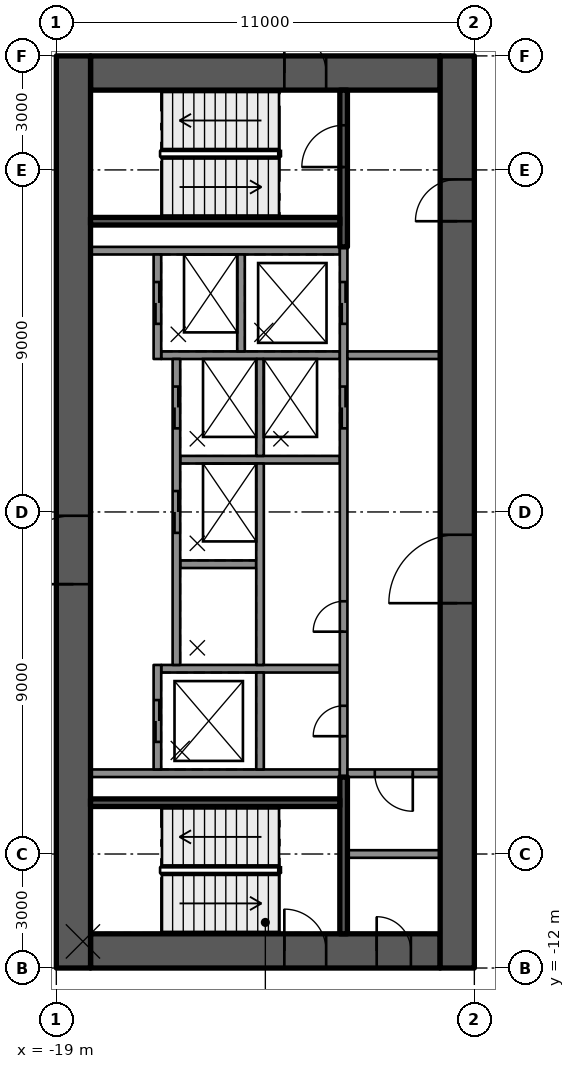
"""IFC4 building model, lengths in metres.
Left out: names, types, materials, properties, quantities, classifications, styles, units other than length and angle.
Written with IfcOpenShell. Run it as: python <this file> out.ifc"""

import sys

from ifc_helpers import new_model, si_unit, direction, frame, frame_2d, origin, place, context, subcontext, project, spatial, rectangle, extrude, element, fill, save


model = new_model("IFC4")
c1 = context("Model", 3, precision=1e-05, world=origin(), true_north=direction((0.0, 1.0)))
c2 = subcontext(c1, "Body", "Model", "MODEL_VIEW")
j1 = project(units=[si_unit("LENGTHUNIT", "METRE"), si_unit("PLANEANGLEUNIT", "RADIAN")], contexts=[c1])
p1 = place(None, origin())
s1 = spatial("IfcSite", under=j1, at=p1, CompositionType="ELEMENT")
p2 = place(p1, origin())
s2 = spatial("IfcBuilding", under=s1, at=p2, CompositionType="ELEMENT")
p3 = place(p2, frame((0.0, 0.0, 184.6)))
s3 = spatial("IfcBuildingStorey", under=s2, at=p3, CompositionType="ELEMENT", Elevation=184.6)
p4 = place(p3, frame((-18.1, 11.55, 0.0), z_axis=(0.0, 0.0, 1.0), x_axis=(1.0, 0.0, 0.0)))
e1 = element("IfcWall", 1, at=p4, inside=s3, PredefinedType="SHEAR", context=c2, shape_type="SweptSolid", body=[
    extrude(rectangle(XDim=9.2, YDim=0.9, at=frame_2d((4.6, 0.0))), origin(), (0.0, 0.0, 1.0), 4.0),
])
p5 = place(p4, frame((5.1, 0.0, 0.0)))
e2 = element("IfcOpeningElement", 2, at=p5, cuts=e1, PredefinedType="OPENING", context=c2, shape_type="SweptSolid", body=[
    extrude(rectangle(XDim=1.1, YDim=2.1, at=frame_2d((0.55, 1.05))), frame((0.0, 0.46, 0.0), z_axis=(0.0, -1.0, 0.0), x_axis=(1.0, 0.0, 0.0)), (0.0, 0.0, 1.0), 0.92),
])
p6 = place(p3, frame((-18.1, -11.55, 0.0), z_axis=(0.0, 0.0, 1.0), x_axis=(1.0, 0.0, 0.0)))
e3 = element("IfcWall", 3, at=p6, inside=s3, PredefinedType="SHEAR", context=c2, shape_type="SweptSolid", body=[
    extrude(rectangle(XDim=9.2, YDim=0.9, at=frame_2d((4.6, 0.0))), origin(), (0.0, 0.0, 1.0), 4.0),
])
p7 = place(p6, frame((5.1, 0.0, 0.0)))
e4 = element("IfcOpeningElement", 4, at=p7, cuts=e3, PredefinedType="OPENING", context=c2, shape_type="SweptSolid", body=[
    extrude(rectangle(XDim=1.1, YDim=2.1, at=frame_2d((0.55, 1.05))), frame((0.0, 0.46, 0.0), z_axis=(0.0, -1.0, 0.0), x_axis=(1.0, 0.0, 0.0)), (0.0, 0.0, 1.0), 0.92),
])
p8 = place(p6, frame((7.53, 0.0, 0.0)))
e5 = element("IfcOpeningElement", 5, at=p8, cuts=e3, PredefinedType="OPENING", context=c2, shape_type="SweptSolid", body=[
    extrude(rectangle(XDim=0.9, YDim=2.1, at=frame_2d((0.45, 1.05))), frame((0.0, 0.46, 0.0), z_axis=(0.0, -1.0, 0.0), x_axis=(1.0, 0.0, 0.0)), (0.0, 0.0, 1.0), 0.92),
])
p9 = place(p3, frame((-18.55, -12.0, 0.0), z_axis=(0.0, 0.0, 1.0), x_axis=(0.0, 1.0, 0.0)))
e6 = element("IfcWall", 6, at=p9, inside=s3, PredefinedType="SHEAR", context=c2, shape_type="SweptSolid", body=[
    extrude(rectangle(XDim=24.0, YDim=0.9, at=frame_2d((12.0, 0.0))), origin(), (0.0, 0.0, 1.0), 4.0),
])
p10 = place(p9, frame((10.1, 0.0, 0.0)))
e7 = element("IfcOpeningElement", 7, at=p10, cuts=e6, PredefinedType="OPENING", context=c2, shape_type="SweptSolid", body=[
    extrude(rectangle(XDim=1.8, YDim=2.1, at=frame_2d((0.9, 1.05))), frame((0.0, 0.46, 0.0), z_axis=(0.0, -1.0, 0.0), x_axis=(1.0, 0.0, 0.0)), (0.0, 0.0, 1.0), 0.92),
])
p11 = place(p3, frame((-8.45, -12.0, 0.0), z_axis=(0.0, 0.0, 1.0), x_axis=(0.0, 1.0, 0.0)))
e8 = element("IfcWall", 8, at=p11, inside=s3, PredefinedType="SHEAR", context=c2, shape_type="SweptSolid", body=[
    extrude(rectangle(XDim=24.0, YDim=0.9, at=frame_2d((12.0, 0.0))), origin(), (0.0, 0.0, 1.0), 4.0),
])
p12 = place(p11, frame((9.6, 0.0, 0.0)))
e9 = element("IfcOpeningElement", 9, at=p12, cuts=e8, PredefinedType="OPENING", context=c2, shape_type="SweptSolid", body=[
    extrude(rectangle(XDim=1.8, YDim=2.1, at=frame_2d((0.9, 1.05))), frame((0.0, 0.46, 0.0), z_axis=(0.0, -1.0, 0.0), x_axis=(1.0, 0.0, 0.0)), (0.0, 0.0, 1.0), 0.92),
])
p13 = place(p11, frame((19.65, 0.0, 0.0)))
e10 = element("IfcOpeningElement", 10, at=p13, cuts=e8, PredefinedType="OPENING", context=c2, shape_type="SweptSolid", body=[
    extrude(rectangle(XDim=1.1, YDim=2.1, at=frame_2d((0.55, 1.05))), frame((0.0, 0.46, 0.0), z_axis=(0.0, -1.0, 0.0), x_axis=(1.0, 0.0, 0.0)), (0.0, 0.0, 1.0), 0.92),
])
for number, where, z_axis, x_axis in (
    (11, (-11.54, 6.875, 0.0), (0.0, 0.0, 1.0), (-1.0, 0.0, 0.0)),
    (12, (-11.54, -6.875, 0.0), (0.0, 0.0, 1.0), (-1.0, 0.0, 0.0)),
):
    element("IfcWall", number, at=place(p3, frame(where, z_axis=z_axis, x_axis=x_axis)), inside=s3, PredefinedType="SOLIDWALL", context=c2, shape_type="SweptSolid", body=[
        extrude(rectangle(XDim=6.56, YDim=0.2, at=frame_2d((3.28, 0.0))), origin(), (0.0, 0.0, 1.0), 3.58),
    ])
p14 = place(p3, frame((-11.54, -4.125, 0.0), z_axis=(0.0, 0.0, 1.0), x_axis=(-1.0, 0.0, 0.0)))
e13 = element("IfcWall", 13, at=p14, inside=s3, PredefinedType="SOLIDWALL", context=c2, shape_type="SweptSolid", body=[
    extrude(rectangle(XDim=4.7, YDim=0.2, at=frame_2d((2.35, 0.0))), origin(), (0.0, 0.0, 1.0), 3.58),
])
p15 = place(p3, frame((-13.74, -1.375, 0.0), z_axis=(0.0, 0.0, 1.0), x_axis=(-1.0, 0.0, 0.0)))
e14 = element("IfcWall", 14, at=p15, inside=s3, PredefinedType="SOLIDWALL", context=c2, shape_type="SweptSolid", body=[
    extrude(rectangle(XDim=2.0, YDim=0.2, at=frame_2d((1.0, 0.0))), origin(), (0.0, 0.0, 1.0), 3.58),
])
p16 = place(p3, frame((-11.54, 1.375, 0.0), z_axis=(0.0, 0.0, 1.0), x_axis=(-1.0, 0.0, 0.0)))
e15 = element("IfcWall", 15, at=p16, inside=s3, PredefinedType="SOLIDWALL", context=c2, shape_type="SweptSolid", body=[
    extrude(rectangle(XDim=4.2, YDim=0.2, at=frame_2d((2.1, 0.0))), origin(), (0.0, 0.0, 1.0), 3.58),
])
p17 = place(p3, frame((-11.54, 4.125, 0.0), z_axis=(0.0, 0.0, 1.0), x_axis=(-1.0, 0.0, 0.0)))
e16 = element("IfcWall", 16, at=p17, inside=s3, PredefinedType="SOLIDWALL", context=c2, shape_type="SweptSolid", body=[
    extrude(rectangle(XDim=4.7, YDim=0.2, at=frame_2d((2.35, 0.0))), origin(), (0.0, 0.0, 1.0), 3.58),
])
p18 = place(p3, frame((-11.44, -6.975, 0.0), z_axis=(0.0, 0.0, 1.0), x_axis=(0.0, 1.0, 0.0)))
e17 = element("IfcWall", 17, at=p18, inside=s3, PredefinedType="SOLIDWALL", context=c2, shape_type="SweptSolid", body=[
    extrude(rectangle(XDim=13.95, YDim=0.2, at=frame_2d((6.975, 0.0))), origin(), (0.0, 0.0, 1.0), 3.58),
])
p19 = place(p18, frame((9.175, 0.0, 0.0)))
e18 = element("IfcOpeningElement", 18, at=p19, cuts=e17, PredefinedType="OPENING", context=c2, shape_type="SweptSolid", body=[
    extrude(rectangle(XDim=1.1, YDim=2.1, at=frame_2d((0.55, 1.05))), frame((0.0, 0.11, 0.0), z_axis=(0.0, -1.0, 0.0), x_axis=(1.0, 0.0, 0.0)), (0.0, 0.0, 1.0), 0.22),
])
p20 = place(p18, frame((11.925, 0.0, 0.0)))
e19 = element("IfcOpeningElement", 19, at=p20, cuts=e17, PredefinedType="OPENING", context=c2, shape_type="SweptSolid", body=[
    extrude(rectangle(XDim=1.1, YDim=2.1, at=frame_2d((0.55, 1.05))), frame((0.0, 0.11, 0.0), z_axis=(0.0, -1.0, 0.0), x_axis=(1.0, 0.0, 0.0)), (0.0, 0.0, 1.0), 0.22),
])
p21 = place(p18, frame((1.075, 0.0, 0.0)))
e20 = element("IfcOpeningElement", 20, at=p21, cuts=e17, PredefinedType="OPENING", context=c2, shape_type="SweptSolid", body=[
    extrude(rectangle(XDim=0.8, YDim=2.1, at=frame_2d((0.4, 1.05))), frame((0.0, 0.11, 0.0), z_axis=(0.0, -1.0, 0.0), x_axis=(1.0, 0.0, 0.0)), (0.0, 0.0, 1.0), 0.22),
])
p22 = place(p18, frame((3.825, 0.0, 0.0)))
e21 = element("IfcOpeningElement", 21, at=p22, cuts=e17, PredefinedType="OPENING", context=c2, shape_type="SweptSolid", body=[
    extrude(rectangle(XDim=0.8, YDim=2.1, at=frame_2d((0.4, 1.05))), frame((0.0, 0.11, 0.0), z_axis=(0.0, -1.0, 0.0), x_axis=(1.0, 0.0, 0.0)), (0.0, 0.0, 1.0), 0.22),
])
p23 = place(p3, frame((-13.64, -6.775, 0.0), z_axis=(0.0, 0.0, 1.0), x_axis=(0.0, 1.0, 0.0)))
e22 = element("IfcWall", 22, at=p23, inside=s3, PredefinedType="SOLIDWALL", context=c2, shape_type="SweptSolid", body=[
    extrude(rectangle(XDim=2.55, YDim=0.2, at=frame_2d((1.275, 0.0))), origin(), (0.0, 0.0, 1.0), 3.58),
])
p24 = place(p3, frame((-13.64, -4.025, 0.0), z_axis=(0.0, 0.0, 1.0), x_axis=(0.0, 1.0, 0.0)))
e23 = element("IfcWall", 23, at=p24, inside=s3, PredefinedType="SOLIDWALL", context=c2, shape_type="SweptSolid", body=[
    extrude(rectangle(XDim=5.3, YDim=0.2, at=frame_2d((2.65, 0.0))), origin(), (0.0, 0.0, 1.0), 3.58),
])
for number, where, z_axis, x_axis in (
    (24, (-13.64, 1.475, 0.0), (0.0, 0.0, 1.0), (0.0, 1.0, 0.0)),
    (25, (-14.14, 4.225, 0.0), (0.0, 0.0, 1.0), (0.0, 1.0, 0.0)),
):
    element("IfcWall", number, at=place(p3, frame(where, z_axis=z_axis, x_axis=x_axis)), inside=s3, PredefinedType="SOLIDWALL", context=c2, shape_type="SweptSolid", body=[
        extrude(rectangle(XDim=2.55, YDim=0.2, at=frame_2d((1.275, 0.0))), origin(), (0.0, 0.0, 1.0), 3.58),
    ])
p25 = place(p3, frame((-16.34, -6.775, 0.0), z_axis=(0.0, 0.0, 1.0), x_axis=(0.0, 1.0, 0.0)))
e26 = element("IfcWall", 26, at=p25, inside=s3, PredefinedType="SOLIDWALL", context=c2, shape_type="SweptSolid", body=[
    extrude(rectangle(XDim=2.75, YDim=0.2, at=frame_2d((1.375, 0.0))), origin(), (0.0, 0.0, 1.0), 3.58),
])
p26 = place(p25, frame((0.725, 0.0, 0.0)))
e27 = element("IfcOpeningElement", 27, at=p26, cuts=e26, PredefinedType="OPENING", context=c2, shape_type="SweptSolid", body=[
    extrude(rectangle(XDim=1.1, YDim=2.1, at=frame_2d((0.55, 1.05))), frame((0.0, 0.11, 0.0), z_axis=(0.0, -1.0, 0.0), x_axis=(1.0, 0.0, 0.0)), (0.0, 0.0, 1.0), 0.22),
])
p27 = place(p3, frame((-15.84, -4.025, 0.0), z_axis=(0.0, 0.0, 1.0), x_axis=(0.0, 1.0, 0.0)))
e28 = element("IfcWall", 28, at=p27, inside=s3, PredefinedType="SOLIDWALL", context=c2, shape_type="SweptSolid", body=[
    extrude(rectangle(XDim=8.05, YDim=0.2, at=frame_2d((4.025, 0.0))), origin(), (0.0, 0.0, 1.0), 3.58),
])
p28 = place(p27, frame((3.475, 0.0, 0.0)))
e29 = element("IfcOpeningElement", 29, at=p28, cuts=e28, PredefinedType="OPENING", context=c2, shape_type="SweptSolid", body=[
    extrude(rectangle(XDim=1.1, YDim=2.1, at=frame_2d((0.55, 1.05))), frame((0.0, 0.11, 0.0), z_axis=(0.0, -1.0, 0.0), x_axis=(1.0, 0.0, 0.0)), (0.0, 0.0, 1.0), 0.22),
])
p29 = place(p27, frame((6.225, 0.0, 0.0)))
e30 = element("IfcOpeningElement", 30, at=p29, cuts=e28, PredefinedType="OPENING", context=c2, shape_type="SweptSolid", body=[
    extrude(rectangle(XDim=1.1, YDim=2.1, at=frame_2d((0.55, 1.05))), frame((0.0, 0.11, 0.0), z_axis=(0.0, -1.0, 0.0), x_axis=(1.0, 0.0, 0.0)), (0.0, 0.0, 1.0), 0.22),
])
p30 = place(p3, frame((-16.34, 4.025, 0.0), z_axis=(0.0, 0.0, 1.0), x_axis=(0.0, 1.0, 0.0)))
e31 = element("IfcWall", 31, at=p30, inside=s3, PredefinedType="SOLIDWALL", context=c2, shape_type="SweptSolid", body=[
    extrude(rectangle(XDim=2.75, YDim=0.2, at=frame_2d((1.375, 0.0))), origin(), (0.0, 0.0, 1.0), 3.58),
])
p31 = place(p30, frame((0.925, 0.0, 0.0)))
e32 = element("IfcOpeningElement", 32, at=p31, cuts=e31, PredefinedType="OPENING", context=c2, shape_type="SweptSolid", body=[
    extrude(rectangle(XDim=1.1, YDim=2.1, at=frame_2d((0.55, 1.05))), frame((0.0, 0.11, 0.0), z_axis=(0.0, -1.0, 0.0), x_axis=(1.0, 0.0, 0.0)), (0.0, 0.0, 1.0), 0.22),
])
p32 = place(p3, frame((-11.44, 6.975, 0.0), z_axis=(0.0, 0.0, 1.0), x_axis=(0.0, 1.0, 0.0)))
e33 = element("IfcWall", 33, at=p32, inside=s3, PredefinedType="SOLIDWALL", context=c2, shape_type="SweptSolid", body=[
    extrude(rectangle(XDim=4.125, YDim=0.2, at=frame_2d((2.062, 0.0))), origin(), (0.0, 0.0, 1.0), 3.58),
])
p33 = place(p32, frame((2.1, 0.0, 0.0)))
e34 = element("IfcOpeningElement", 34, at=p33, cuts=e33, PredefinedType="OPENING", context=c2, shape_type="SweptSolid", body=[
    extrude(rectangle(XDim=1.1, YDim=2.1, at=frame_2d((0.55, 1.05))), frame((0.0, 0.11, 0.0), z_axis=(0.0, -1.0, 0.0), x_axis=(1.0, 0.0, 0.0)), (0.0, 0.0, 1.0), 0.22),
])
p34 = place(p3, frame((-11.54, 7.65, 0.0), z_axis=(0.0, 0.0, 1.0), x_axis=(-1.0, 0.0, 0.0)))
e35 = element("IfcWall", 35, at=p34, inside=s3, PredefinedType="SOLIDWALL", context=c2, shape_type="SweptSolid", body=[
    extrude(rectangle(XDim=6.56, YDim=0.2, at=frame_2d((3.28, 0.0))), origin(), (0.0, 0.0, 1.0), 3.58),
])
p35 = place(p3, frame((-11.44, -11.1, 0.0), z_axis=(0.0, 0.0, 1.0), x_axis=(0.0, 1.0, 0.0)))
e36 = element("IfcWall", 36, at=p35, inside=s3, PredefinedType="SOLIDWALL", context=c2, shape_type="SweptSolid", body=[
    extrude(rectangle(XDim=4.125, YDim=0.2, at=frame_2d((2.062, 0.0))), origin(), (0.0, 0.0, 1.0), 3.58),
])
p36 = place(p3, frame((-11.54, -7.65, 0.0), z_axis=(0.0, 0.0, 1.0), x_axis=(-1.0, 0.0, 0.0)))
e37 = element("IfcWall", 37, at=p36, inside=s3, PredefinedType="SOLIDWALL", context=c2, shape_type="SweptSolid", body=[
    extrude(rectangle(XDim=6.56, YDim=0.2, at=frame_2d((3.28, 0.0))), origin(), (0.0, 0.0, 1.0), 3.58),
])
p37 = place(p3, frame((-8.9, 4.125, 0.0), z_axis=(0.0, 0.0, 1.0), x_axis=(-1.0, 0.0, 0.0)))
e38 = element("IfcWall", 38, at=p37, inside=s3, PredefinedType="PARTITIONING", context=c2, shape_type="SweptSolid", body=[
    extrude(rectangle(XDim=2.44, YDim=0.2, at=frame_2d((1.22, 0.0))), origin(), (0.0, 0.0, 1.0), 3.58),
])
p38 = place(p3, frame((-8.9, -6.875, 0.0), z_axis=(0.0, 0.0, 1.0), x_axis=(-1.0, 0.0, 0.0)))
e39 = element("IfcWall", 39, at=p38, inside=s3, PredefinedType="PARTITIONING", context=c2, shape_type="SweptSolid", body=[
    extrude(rectangle(XDim=2.44, YDim=0.2, at=frame_2d((1.22, 0.0))), origin(), (0.0, 0.0, 1.0), 3.58),
])
p39 = place(p38, frame((0.72, 0.0, 0.0)))
e40 = element("IfcOpeningElement", 40, at=p39, cuts=e39, PredefinedType="OPENING", context=c2, shape_type="SweptSolid", body=[
    extrude(rectangle(XDim=1.0, YDim=2.1, at=frame_2d((0.5, 1.05))), frame((0.0, 0.11, 0.0), z_axis=(0.0, -1.0, 0.0), x_axis=(1.0, 0.0, 0.0)), (0.0, 0.0, 1.0), 0.22),
])
p40 = place(p3, frame((-8.9, -9.0, 0.0), z_axis=(0.0, 0.0, 1.0), x_axis=(-1.0, 0.0, 0.0)))
e41 = element("IfcWall", 41, at=p40, inside=s3, PredefinedType="PARTITIONING", context=c2, shape_type="SweptSolid", body=[
    extrude(rectangle(XDim=2.44, YDim=0.2, at=frame_2d((1.22, 0.0))), origin(), (0.0, 0.0, 1.0), 3.58),
])
p41 = place(p26, origin())
e42 = element("IfcDoor", 42, at=p41, inside=s3, OperationType="DOUBLE_DOOR_SLIDING", PredefinedType="DOOR", context=c2, shape_type="SweptSolid", body=[
    extrude(rectangle(XDim=1.1, YDim=2.1, at=frame_2d((0.55, 1.05))), frame((0.0, 0.025, 0.0), z_axis=(0.0, -1.0, 0.0), x_axis=(1.0, 0.0, 0.0)), (0.0, 0.0, 1.0), 0.05),
])
fill(e27, e42)
p42 = place(p28, origin())
e43 = element("IfcDoor", 43, at=p42, inside=s3, OperationType="DOUBLE_DOOR_SLIDING", PredefinedType="DOOR", context=c2, shape_type="SweptSolid", body=[
    extrude(rectangle(XDim=1.1, YDim=2.1, at=frame_2d((0.55, 1.05))), frame((0.0, 0.025, 0.0), z_axis=(0.0, -1.0, 0.0), x_axis=(1.0, 0.0, 0.0)), (0.0, 0.0, 1.0), 0.05),
])
fill(e29, e43)
p43 = place(p19, origin())
e44 = element("IfcDoor", 44, at=p43, inside=s3, OperationType="DOUBLE_DOOR_SLIDING", PredefinedType="DOOR", context=c2, shape_type="SweptSolid", body=[
    extrude(rectangle(XDim=1.1, YDim=2.1, at=frame_2d((0.55, 1.05))), frame((0.0, 0.025, 0.0), z_axis=(0.0, -1.0, 0.0), x_axis=(1.0, 0.0, 0.0)), (0.0, 0.0, 1.0), 0.05),
])
fill(e18, e44)
p44 = place(p29, origin())
e45 = element("IfcDoor", 45, at=p44, inside=s3, OperationType="DOUBLE_DOOR_SLIDING", PredefinedType="DOOR", context=c2, shape_type="SweptSolid", body=[
    extrude(rectangle(XDim=1.1, YDim=2.1, at=frame_2d((0.55, 1.05))), frame((0.0, 0.025, 0.0), z_axis=(0.0, -1.0, 0.0), x_axis=(1.0, 0.0, 0.0)), (0.0, 0.0, 1.0), 0.05),
])
fill(e30, e45)
p45 = place(p20, origin())
e46 = element("IfcDoor", 46, at=p45, inside=s3, OperationType="DOUBLE_DOOR_SLIDING", PredefinedType="DOOR", context=c2, shape_type="SweptSolid", body=[
    extrude(rectangle(XDim=1.1, YDim=2.1, at=frame_2d((0.55, 1.05))), frame((0.0, 0.025, 0.0), z_axis=(0.0, -1.0, 0.0), x_axis=(1.0, 0.0, 0.0)), (0.0, 0.0, 1.0), 0.05),
])
fill(e19, e46)
p46 = place(p31, origin())
e47 = element("IfcDoor", 47, at=p46, inside=s3, OperationType="DOUBLE_DOOR_SLIDING", PredefinedType="DOOR", context=c2, shape_type="SweptSolid", body=[
    extrude(rectangle(XDim=1.1, YDim=2.1, at=frame_2d((0.55, 1.05))), frame((0.0, 0.025, 0.0), z_axis=(0.0, -1.0, 0.0), x_axis=(1.0, 0.0, 0.0)), (0.0, 0.0, 1.0), 0.05),
])
fill(e32, e47)
p47 = place(p21, origin())
e48 = element("IfcDoor", 48, at=p47, inside=s3, OperationType="SINGLE_SWING_LEFT", PredefinedType="DOOR", context=c2, shape_type="SweptSolid", body=[
    extrude(rectangle(XDim=0.8, YDim=2.1, at=frame_2d((0.4, 1.05))), frame((0.0, 0.025, 0.0), z_axis=(0.0, -1.0, 0.0), x_axis=(1.0, 0.0, 0.0)), (0.0, 0.0, 1.0), 0.05),
])
fill(e20, e48)
p48 = place(p22, origin())
e49 = element("IfcDoor", 49, at=p48, inside=s3, OperationType="SINGLE_SWING_LEFT", PredefinedType="DOOR", context=c2, shape_type="SweptSolid", body=[
    extrude(rectangle(XDim=0.8, YDim=2.1, at=frame_2d((0.4, 1.05))), frame((0.0, 0.025, 0.0), z_axis=(0.0, -1.0, 0.0), x_axis=(1.0, 0.0, 0.0)), (0.0, 0.0, 1.0), 0.05),
])
fill(e21, e49)
p49 = place(p12, origin())
e50 = element("IfcDoor", 50, at=p49, inside=s3, OperationType="SINGLE_SWING_LEFT", PredefinedType="DOOR", context=c2, shape_type="SweptSolid", body=[
    extrude(rectangle(XDim=1.8, YDim=2.1, at=frame_2d((0.9, 1.05))), frame((0.0, 0.025, 0.0), z_axis=(0.0, -1.0, 0.0), x_axis=(1.0, 0.0, 0.0)), (0.0, 0.0, 1.0), 0.05),
])
fill(e9, e50)
p50 = place(p10, origin())
e51 = element("IfcDoor", 51, at=p50, inside=s3, OperationType="SINGLE_SWING_LEFT", PredefinedType="DOOR", context=c2, shape_type="SweptSolid", body=[
    extrude(rectangle(XDim=1.8, YDim=2.1, at=frame_2d((0.9, 1.05))), frame((0.0, 0.025, 0.0), z_axis=(0.0, -1.0, 0.0), x_axis=(1.0, 0.0, 0.0)), (0.0, 0.0, 1.0), 0.05),
])
fill(e7, e51)
p51 = place(p13, origin())
e52 = element("IfcDoor", 52, at=p51, inside=s3, OperationType="SINGLE_SWING_RIGHT", PredefinedType="DOOR", context=c2, shape_type="SweptSolid", body=[
    extrude(rectangle(XDim=1.1, YDim=2.1, at=frame_2d((0.55, 1.05))), frame((0.0, 0.025, 0.0), z_axis=(0.0, -1.0, 0.0), x_axis=(1.0, 0.0, 0.0)), (0.0, 0.0, 1.0), 0.05),
])
fill(e10, e52)
p52 = place(p5, origin())
e53 = element("IfcDoor", 53, at=p52, inside=s3, OperationType="SINGLE_SWING_RIGHT", PredefinedType="DOOR", context=c2, shape_type="SweptSolid", body=[
    extrude(rectangle(XDim=1.1, YDim=2.1, at=frame_2d((0.55, 1.05))), frame((0.0, 0.025, 0.0), z_axis=(0.0, -1.0, 0.0), x_axis=(1.0, 0.0, 0.0)), (0.0, 0.0, 1.0), 0.05),
])
fill(e2, e53)
p53 = place(p7, origin())
e54 = element("IfcDoor", 54, at=p53, inside=s3, OperationType="SINGLE_SWING_RIGHT", PredefinedType="DOOR", context=c2, shape_type="SweptSolid", body=[
    extrude(rectangle(XDim=1.1, YDim=2.1, at=frame_2d((0.55, 1.05))), frame((0.0, 0.025, 0.0), z_axis=(0.0, -1.0, 0.0), x_axis=(1.0, 0.0, 0.0)), (0.0, 0.0, 1.0), 0.05),
])
fill(e4, e54)
p54 = place(p33, origin())
e55 = element("IfcDoor", 55, at=p54, inside=s3, OperationType="SINGLE_SWING_RIGHT", PredefinedType="DOOR", context=c2, shape_type="SweptSolid", body=[
    extrude(rectangle(XDim=1.1, YDim=2.1, at=frame_2d((0.55, 1.05))), frame((0.0, 0.025, 0.0), z_axis=(0.0, -1.0, 0.0), x_axis=(1.0, 0.0, 0.0)), (0.0, 0.0, 1.0), 0.05),
])
fill(e34, e55)
p55 = place(p8, origin())
e56 = element("IfcDoor", 56, at=p55, inside=s3, OperationType="SINGLE_SWING_RIGHT", PredefinedType="DOOR", context=c2, shape_type="SweptSolid", body=[
    extrude(rectangle(XDim=0.9, YDim=2.1, at=frame_2d((0.45, 1.05))), frame((0.0, 0.025, 0.0), z_axis=(0.0, -1.0, 0.0), x_axis=(1.0, 0.0, 0.0)), (0.0, 0.0, 1.0), 0.05),
])
fill(e5, e56)
p56 = place(p39, origin())
e57 = element("IfcDoor", 57, at=p56, inside=s3, OperationType="SINGLE_SWING_RIGHT", PredefinedType="DOOR", context=c2, shape_type="SweptSolid", body=[
    extrude(rectangle(XDim=1.0, YDim=2.1, at=frame_2d((0.5, 1.05))), frame((0.0, 0.025, 0.0), z_axis=(0.0, -1.0, 0.0), x_axis=(1.0, 0.0, 0.0)), (0.0, 0.0, 1.0), 0.05),
])
fill(e40, e57)
save(model, sys.argv[1])
